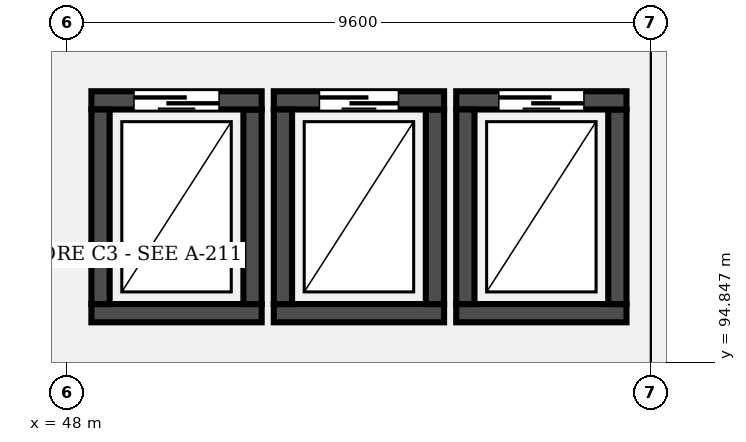
"""IFC4 building model, lengths in metres.
Left out: names, types, materials, properties, quantities, classifications, styles, units other than length and angle.
Written with IfcOpenShell. Run it as: python <this file> out.ifc"""

import sys

from ifc_helpers import new_model, si_unit, direction, frame, frame_2d, origin, place, context, subcontext, project, spatial, rectangle, extrude, element, fill, save


model = new_model("IFC4")
c1 = context("Model", 3, precision=1e-05, world=origin(), true_north=direction((0.0, 1.0)))
c2 = subcontext(c1, "Body", "Model", "MODEL_VIEW")
j1 = project(units=[si_unit("LENGTHUNIT", "METRE"), si_unit("PLANEANGLEUNIT", "RADIAN")], contexts=[c1])
p1 = place(None, origin())
s1 = spatial("IfcSite", under=j1, at=p1, CompositionType="ELEMENT")
p2 = place(p1, origin())
s2 = spatial("IfcBuilding", under=s1, at=p2, CompositionType="ELEMENT")
p3 = place(p2, origin())
s3 = spatial("IfcBuildingStorey", under=s2, at=p3, CompositionType="ELEMENT", Elevation=0.0)
p4 = place(p3, frame((48.4, 95.65, 0.0), z_axis=(0.0, 0.0, 1.0), x_axis=(1.0, 0.0, 0.0)))
e1 = element("IfcWall", 1, at=p4, inside=s3, PredefinedType="SHEAR", context=c2, shape_type="SweptSolid", body=[
    extrude(rectangle(XDim=2.8, YDim=0.3, at=frame_2d((1.4, 0.0))), origin(), (0.0, 0.0, 1.0), 5.1),
])
p5 = place(p3, frame((51.05, 95.8, 0.0), z_axis=(0.0, 0.0, 1.0), x_axis=(0.0, 1.0, 0.0)))
e2 = element("IfcWall", 2, at=p5, inside=s3, PredefinedType="SHEAR", context=c2, shape_type="SweptSolid", body=[
    extrude(rectangle(XDim=3.2, YDim=0.3, at=frame_2d((1.6, 0.0))), origin(), (0.0, 0.0, 1.0), 5.1),
])
p6 = place(p3, frame((51.2, 99.15, 0.0), z_axis=(0.0, 0.0, 1.0), x_axis=(-1.0, 0.0, 0.0)))
e3 = element("IfcWall", 3, at=p6, inside=s3, PredefinedType="SHEAR", context=c2, shape_type="SweptSolid", body=[
    extrude(rectangle(XDim=2.8, YDim=0.3, at=frame_2d((1.4, 0.0))), origin(), (0.0, 0.0, 1.0), 5.1),
])
p7 = place(p6, frame((0.7, 0.0, 0.0)))
e4 = element("IfcOpeningElement", 4, at=p7, cuts=e3, PredefinedType="OPENING", context=c2, shape_type="SweptSolid", body=[
    extrude(rectangle(XDim=1.4, YDim=2.3, at=frame_2d((0.7, 1.15))), frame((0.0, 0.16, 0.0), z_axis=(0.0, -1.0, 0.0), x_axis=(1.0, 0.0, 0.0)), (0.0, 0.0, 1.0), 0.32),
])
p8 = place(p3, frame((48.55, 99.0, 0.0), z_axis=(0.0, 0.0, 1.0), x_axis=(0.0, -1.0, 0.0)))
e5 = element("IfcWall", 5, at=p8, inside=s3, PredefinedType="SHEAR", context=c2, shape_type="SweptSolid", body=[
    extrude(rectangle(XDim=3.2, YDim=0.3, at=frame_2d((1.6, 0.0))), origin(), (0.0, 0.0, 1.0), 5.1),
])
p9 = place(p3, frame((51.4, 95.65, 0.0), z_axis=(0.0, 0.0, 1.0), x_axis=(1.0, 0.0, 0.0)))
e6 = element("IfcWall", 6, at=p9, inside=s3, PredefinedType="SHEAR", context=c2, shape_type="SweptSolid", body=[
    extrude(rectangle(XDim=2.8, YDim=0.3, at=frame_2d((1.4, 0.0))), origin(), (0.0, 0.0, 1.0), 5.1),
])
p10 = place(p3, frame((54.05, 95.8, 0.0), z_axis=(0.0, 0.0, 1.0), x_axis=(0.0, 1.0, 0.0)))
e7 = element("IfcWall", 7, at=p10, inside=s3, PredefinedType="SHEAR", context=c2, shape_type="SweptSolid", body=[
    extrude(rectangle(XDim=3.2, YDim=0.3, at=frame_2d((1.6, 0.0))), origin(), (0.0, 0.0, 1.0), 5.1),
])
p11 = place(p3, frame((54.2, 99.15, 0.0), z_axis=(0.0, 0.0, 1.0), x_axis=(-1.0, 0.0, 0.0)))
e8 = element("IfcWall", 8, at=p11, inside=s3, PredefinedType="SHEAR", context=c2, shape_type="SweptSolid", body=[
    extrude(rectangle(XDim=2.8, YDim=0.3, at=frame_2d((1.4, 0.0))), origin(), (0.0, 0.0, 1.0), 5.1),
])
p12 = place(p11, frame((0.75, 0.0, 0.0)))
e9 = element("IfcOpeningElement", 9, at=p12, cuts=e8, PredefinedType="OPENING", context=c2, shape_type="SweptSolid", body=[
    extrude(rectangle(XDim=1.3, YDim=2.3, at=frame_2d((0.65, 1.15))), frame((0.0, 0.16, 0.0), z_axis=(0.0, -1.0, 0.0), x_axis=(1.0, 0.0, 0.0)), (0.0, 0.0, 1.0), 0.32),
])
p13 = place(p3, frame((51.55, 99.0, 0.0), z_axis=(0.0, 0.0, 1.0), x_axis=(0.0, -1.0, 0.0)))
e10 = element("IfcWall", 10, at=p13, inside=s3, PredefinedType="SHEAR", context=c2, shape_type="SweptSolid", body=[
    extrude(rectangle(XDim=3.2, YDim=0.3, at=frame_2d((1.6, 0.0))), origin(), (0.0, 0.0, 1.0), 5.1),
])
p14 = place(p3, frame((54.4, 95.65, 0.0), z_axis=(0.0, 0.0, 1.0), x_axis=(1.0, 0.0, 0.0)))
e11 = element("IfcWall", 11, at=p14, inside=s3, PredefinedType="SHEAR", context=c2, shape_type="SweptSolid", body=[
    extrude(rectangle(XDim=2.8, YDim=0.3, at=frame_2d((1.4, 0.0))), origin(), (0.0, 0.0, 1.0), 5.1),
])
p15 = place(p3, frame((57.05, 95.8, 0.0), z_axis=(0.0, 0.0, 1.0), x_axis=(0.0, 1.0, 0.0)))
e12 = element("IfcWall", 12, at=p15, inside=s3, PredefinedType="SHEAR", context=c2, shape_type="SweptSolid", body=[
    extrude(rectangle(XDim=3.2, YDim=0.3, at=frame_2d((1.6, 0.0))), origin(), (0.0, 0.0, 1.0), 5.1),
])
p16 = place(p3, frame((57.2, 99.15, 0.0), z_axis=(0.0, 0.0, 1.0), x_axis=(-1.0, 0.0, 0.0)))
e13 = element("IfcWall", 13, at=p16, inside=s3, PredefinedType="SHEAR", context=c2, shape_type="SweptSolid", body=[
    extrude(rectangle(XDim=2.8, YDim=0.3, at=frame_2d((1.4, 0.0))), origin(), (0.0, 0.0, 1.0), 5.1),
])
p17 = place(p16, frame((0.7, 0.0, 0.0)))
e14 = element("IfcOpeningElement", 14, at=p17, cuts=e13, PredefinedType="OPENING", context=c2, shape_type="SweptSolid", body=[
    extrude(rectangle(XDim=1.4, YDim=2.3, at=frame_2d((0.7, 1.15))), frame((0.0, 0.16, 0.0), z_axis=(0.0, -1.0, 0.0), x_axis=(1.0, 0.0, 0.0)), (0.0, 0.0, 1.0), 0.32),
])
p18 = place(p3, frame((54.55, 99.0, 0.0), z_axis=(0.0, 0.0, 1.0), x_axis=(0.0, -1.0, 0.0)))
e15 = element("IfcWall", 15, at=p18, inside=s3, PredefinedType="SHEAR", context=c2, shape_type="SweptSolid", body=[
    extrude(rectangle(XDim=3.2, YDim=0.3, at=frame_2d((1.6, 0.0))), origin(), (0.0, 0.0, 1.0), 5.1),
])
p19 = place(p7, origin())
e16 = element("IfcDoor", 16, at=p19, inside=s3, OperationType="SLIDING_TO_RIGHT", PredefinedType="DOOR", context=c2, shape_type="SweptSolid", body=[
    extrude(rectangle(XDim=1.4, YDim=2.3, at=frame_2d((0.7, 1.15))), frame((0.0, 0.025, 0.0), z_axis=(0.0, -1.0, 0.0), x_axis=(1.0, 0.0, 0.0)), (0.0, 0.0, 1.0), 0.05),
])
fill(e4, e16)
p20 = place(p12, origin())
e17 = element("IfcDoor", 17, at=p20, inside=s3, OperationType="SLIDING_TO_RIGHT", PredefinedType="DOOR", context=c2, shape_type="SweptSolid", body=[
    extrude(rectangle(XDim=1.3, YDim=2.3, at=frame_2d((0.65, 1.15))), frame((0.0, 0.025, 0.0), z_axis=(0.0, -1.0, 0.0), x_axis=(1.0, 0.0, 0.0)), (0.0, 0.0, 1.0), 0.05),
])
fill(e9, e17)
p21 = place(p17, origin())
e18 = element("IfcDoor", 18, at=p21, inside=s3, OperationType="SLIDING_TO_RIGHT", PredefinedType="DOOR", context=c2, shape_type="SweptSolid", body=[
    extrude(rectangle(XDim=1.4, YDim=2.3, at=frame_2d((0.7, 1.15))), frame((0.0, 0.025, 0.0), z_axis=(0.0, -1.0, 0.0), x_axis=(1.0, 0.0, 0.0)), (0.0, 0.0, 1.0), 0.05),
])
fill(e14, e18)
save(model, sys.argv[1])
